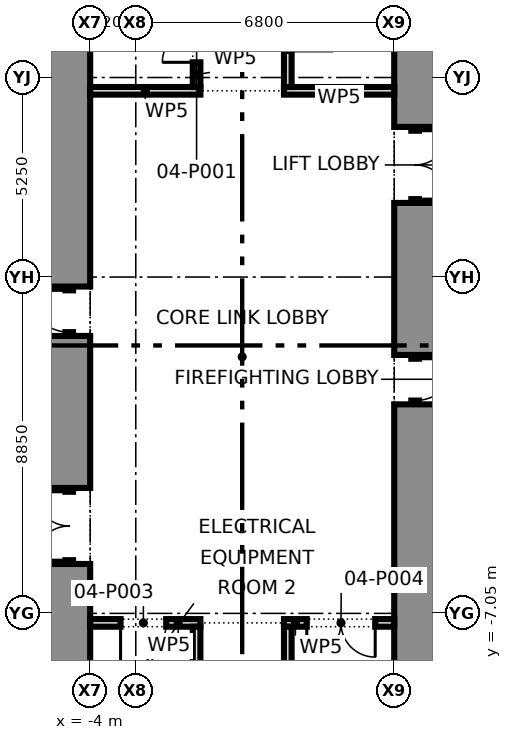
"""IFC4 building model, lengths in metres.
Left out: names, types, materials, properties, quantities, classifications, styles, units other than length and angle.
Written with IfcOpenShell. Run it as: python <this file> out.ifc"""

import sys

from ifc_helpers import new_model, si_unit, direction, frame, frame_2d, origin, place, context, subcontext, project, spatial, rectangle, extrude, element, fill, save


model = new_model("IFC4")
c1 = context("Model", 3, precision=1e-05, world=origin(), true_north=direction((0.0, 1.0)))
c2 = subcontext(c1, "Body", "Model", "MODEL_VIEW")
j1 = project(units=[si_unit("LENGTHUNIT", "METRE"), si_unit("PLANEANGLEUNIT", "RADIAN")], contexts=[c1])
p1 = place(None, origin())
s1 = spatial("IfcSite", under=j1, at=p1, CompositionType="ELEMENT")
p2 = place(p1, origin())
s2 = spatial("IfcBuilding", under=s1, at=p2, CompositionType="ELEMENT")
p3 = place(p2, frame((0.0, 0.0, 16.1)))
s3 = spatial("IfcBuildingStorey", under=s2, at=p3, CompositionType="ELEMENT", Elevation=16.1)
p4 = place(p3, frame((-4.55, -8.9, 0.0), z_axis=(0.0, 0.0, 1.0), x_axis=(0.0, 1.0, 0.0)))
e1 = element("IfcWall", 1, at=p4, inside=s3, PredefinedType="SHEAR", context=c2, shape_type="SweptSolid", body=[
    extrude(rectangle(XDim=3.15, YDim=1.1, at=frame_2d((1.575, 0.0))), origin(), (0.0, 0.0, 1.0), 4.575),
])
p5 = place(p3, frame((-4.55, -5.75, 0.0), z_axis=(0.0, 0.0, 1.0), x_axis=(0.0, 1.0, 0.0)))
e2 = element("IfcWall", 2, at=p5, inside=s3, PredefinedType="PARTITIONING", context=c2, shape_type="SweptSolid", body=[
    extrude(rectangle(XDim=2.0, YDim=0.2, at=frame_2d((1.0, 0.0))), origin(), (0.0, 0.0, 1.0), 2.4),
])
p6 = place(p5, frame((0.1, 0.0, 0.0)))
e3 = element("IfcOpeningElement", 3, at=p6, cuts=e2, PredefinedType="OPENING", context=c2, shape_type="SweptSolid", body=[
    extrude(rectangle(XDim=1.8, YDim=2.1, at=frame_2d((0.9, 1.05))), frame((0.0, 0.11, 0.0), z_axis=(0.0, -1.0, 0.0), x_axis=(1.0, 0.0, 0.0)), (0.0, 0.0, 1.0), 0.22),
])
p7 = place(p3, frame((-4.55, -3.75, 0.0), z_axis=(0.0, 0.0, 1.0), x_axis=(0.0, 1.0, 0.0)))
e4 = element("IfcWall", 4, at=p7, inside=s3, PredefinedType="SHEAR", context=c2, shape_type="SweptSolid", body=[
    extrude(rectangle(XDim=4.0, YDim=1.1, at=frame_2d((2.0, 0.0))), origin(), (0.0, 0.0, 1.0), 4.575),
])
p8 = place(p3, frame((-4.55, 0.25, 0.0), z_axis=(0.0, 0.0, 1.0), x_axis=(0.0, 1.0, 0.0)))
e5 = element("IfcWall", 5, at=p8, inside=s3, PredefinedType="PARTITIONING", context=c2, shape_type="SweptSolid", body=[
    extrude(rectangle(XDim=1.3, YDim=0.2, at=frame_2d((0.65, 0.0))), origin(), (0.0, 0.0, 1.0), 2.4),
])
p9 = place(p8, frame((0.1, 0.0, 0.0)))
e6 = element("IfcOpeningElement", 6, at=p9, cuts=e5, PredefinedType="OPENING", context=c2, shape_type="SweptSolid", body=[
    extrude(rectangle(XDim=1.1, YDim=2.1, at=frame_2d((0.55, 1.05))), frame((0.0, 0.11, 0.0), z_axis=(0.0, -1.0, 0.0), x_axis=(1.0, 0.0, 0.0)), (0.0, 0.0, 1.0), 0.22),
])
p10 = place(p3, frame((-4.55, 1.55, 0.0), z_axis=(0.0, 0.0, 1.0), x_axis=(0.0, 1.0, 0.0)))
e7 = element("IfcWall", 7, at=p10, inside=s3, PredefinedType="SHEAR", context=c2, shape_type="SweptSolid", body=[
    extrude(rectangle(XDim=7.35, YDim=1.1, at=frame_2d((3.675, 0.0))), origin(), (0.0, 0.0, 1.0), 4.575),
])
p11 = place(p3, frame((4.55, 8.9, 0.0), z_axis=(0.0, 0.0, 1.0), x_axis=(0.0, -1.0, 0.0)))
e8 = element("IfcWall", 8, at=p11, inside=s3, PredefinedType="SHEAR", context=c2, shape_type="SweptSolid", body=[
    extrude(rectangle(XDim=3.15, YDim=1.1, at=frame_2d((1.575, 0.0))), origin(), (0.0, 0.0, 1.0), 4.575),
])
p12 = place(p3, frame((4.55, 5.75, 0.0), z_axis=(0.0, 0.0, 1.0), x_axis=(0.0, -1.0, 0.0)))
e9 = element("IfcWall", 9, at=p12, inside=s3, PredefinedType="PARTITIONING", context=c2, shape_type="SweptSolid", body=[
    extrude(rectangle(XDim=2.0, YDim=0.2, at=frame_2d((1.0, 0.0))), origin(), (0.0, 0.0, 1.0), 2.4),
])
p13 = place(p12, frame((0.1, 0.0, 0.0)))
e10 = element("IfcOpeningElement", 10, at=p13, cuts=e9, PredefinedType="OPENING", context=c2, shape_type="SweptSolid", body=[
    extrude(rectangle(XDim=1.8, YDim=2.1, at=frame_2d((0.9, 1.05))), frame((0.0, 0.11, 0.0), z_axis=(0.0, -1.0, 0.0), x_axis=(1.0, 0.0, 0.0)), (0.0, 0.0, 1.0), 0.22),
])
p14 = place(p3, frame((4.55, 3.75, 0.0), z_axis=(0.0, 0.0, 1.0), x_axis=(0.0, -1.0, 0.0)))
e11 = element("IfcWall", 11, at=p14, inside=s3, PredefinedType="SHEAR", context=c2, shape_type="SweptSolid", body=[
    extrude(rectangle(XDim=4.0, YDim=1.1, at=frame_2d((2.0, 0.0))), origin(), (0.0, 0.0, 1.0), 4.575),
])
p15 = place(p3, frame((4.55, -0.25, 0.0), z_axis=(0.0, 0.0, 1.0), x_axis=(0.0, -1.0, 0.0)))
e12 = element("IfcWall", 12, at=p15, inside=s3, PredefinedType="PARTITIONING", context=c2, shape_type="SweptSolid", body=[
    extrude(rectangle(XDim=1.3, YDim=0.2, at=frame_2d((0.65, 0.0))), origin(), (0.0, 0.0, 1.0), 2.4),
])
p16 = place(p15, frame((0.1, 0.0, 0.0)))
e13 = element("IfcOpeningElement", 13, at=p16, cuts=e12, PredefinedType="OPENING", context=c2, shape_type="SweptSolid", body=[
    extrude(rectangle(XDim=1.1, YDim=2.1, at=frame_2d((0.55, 1.05))), frame((0.0, 0.11, 0.0), z_axis=(0.0, -1.0, 0.0), x_axis=(1.0, 0.0, 0.0)), (0.0, 0.0, 1.0), 0.22),
])
p17 = place(p3, frame((4.55, -1.55, 0.0), z_axis=(0.0, 0.0, 1.0), x_axis=(0.0, -1.0, 0.0)))
e14 = element("IfcWall", 14, at=p17, inside=s3, PredefinedType="SHEAR", context=c2, shape_type="SweptSolid", body=[
    extrude(rectangle(XDim=7.35, YDim=1.1, at=frame_2d((3.675, 0.0))), origin(), (0.0, 0.0, 1.0), 4.575),
])
p18 = place(p3, frame((-4.0, -7.3, 0.0), z_axis=(0.0, 0.0, 1.0), x_axis=(1.0, 0.0, 0.0)))
e15 = element("IfcWall", 15, at=p18, inside=s3, PredefinedType="PARTITIONING", context=c2, shape_type="SweptSolid", body=[
    extrude(rectangle(XDim=2.9, YDim=0.2, at=frame_2d((1.45, 0.0))), origin(), (0.0, 0.0, 1.0), 4.575),
])
p19 = place(p18, frame((0.8, 0.0, 0.0)))
e16 = element("IfcOpeningElement", 16, at=p19, cuts=e15, PredefinedType="OPENING", context=c2, shape_type="SweptSolid", body=[
    extrude(rectangle(XDim=1.2, YDim=2.1, at=frame_2d((0.6, 1.05))), frame((0.0, 0.11, 0.0), z_axis=(0.0, -1.0, 0.0), x_axis=(1.0, 0.0, 0.0)), (0.0, 0.0, 1.0), 0.22),
])
p20 = place(p3, frame((1.1, -7.3, 0.0), z_axis=(0.0, 0.0, 1.0), x_axis=(1.0, 0.0, 0.0)))
e17 = element("IfcWall", 17, at=p20, inside=s3, PredefinedType="PARTITIONING", context=c2, shape_type="SweptSolid", body=[
    extrude(rectangle(XDim=2.9, YDim=0.2, at=frame_2d((1.45, 0.0))), origin(), (0.0, 0.0, 1.0), 4.575),
])
p21 = place(p20, frame((0.6, 0.0, 0.0)))
e18 = element("IfcOpeningElement", 18, at=p21, cuts=e17, PredefinedType="OPENING", context=c2, shape_type="SweptSolid", body=[
    extrude(rectangle(XDim=1.8, YDim=2.1, at=frame_2d((0.9, 1.05))), frame((0.0, 0.11, 0.0), z_axis=(0.0, -1.0, 0.0), x_axis=(1.0, 0.0, 0.0)), (0.0, 0.0, 1.0), 0.22),
])
for number, where, z_axis, x_axis in (
    (19, (-4.0, 6.7, 0.0), (0.0, 0.0, 1.0), (1.0, 0.0, 0.0)),
    (20, (1.1, 6.7, 0.0), (0.0, 0.0, 1.0), (1.0, 0.0, 0.0)),
):
    element("IfcWall", number, at=place(p3, frame(where, z_axis=z_axis, x_axis=x_axis)), inside=s3, PredefinedType="PARTITIONING", context=c2, shape_type="SweptSolid", body=[
        extrude(rectangle(XDim=2.9, YDim=0.2, at=frame_2d((1.45, 0.0))), origin(), (0.0, 0.0, 1.0), 4.575),
    ])
p22 = place(p3, frame((1.2, -9.9, 0.0), z_axis=(0.0, 0.0, 1.0), x_axis=(0.0, 1.0, 0.0)))
e21 = element("IfcWall", 21, at=p22, inside=s3, PredefinedType="PARTITIONING", context=c2, shape_type="SweptSolid", body=[
    extrude(rectangle(XDim=2.5, YDim=0.2, at=frame_2d((1.25, 0.0))), origin(), (0.0, 0.0, 1.0), 4.575),
])
p23 = place(p3, frame((1.2, 6.8, 0.0), z_axis=(0.0, 0.0, 1.0), x_axis=(0.0, 1.0, 0.0)))
e22 = element("IfcWall", 22, at=p23, inside=s3, PredefinedType="PARTITIONING", context=c2, shape_type="SweptSolid", body=[
    extrude(rectangle(XDim=3.1, YDim=0.2, at=frame_2d((1.55, 0.0))), origin(), (0.0, 0.0, 1.0), 4.575),
])
p24 = place(p23, frame((0.95, 0.0, 0.0)))
e23 = element("IfcOpeningElement", 23, at=p24, cuts=e22, PredefinedType="OPENING", context=c2, shape_type="SweptSolid", body=[
    extrude(rectangle(XDim=1.2, YDim=2.1, at=frame_2d((0.6, 1.05))), frame((0.0, 0.11, 0.0), z_axis=(0.0, -1.0, 0.0), x_axis=(1.0, 0.0, 0.0)), (0.0, 0.0, 1.0), 0.22),
])
p25 = place(p3, frame((-1.2, -9.9, 0.0), z_axis=(0.0, 0.0, 1.0), x_axis=(0.0, 1.0, 0.0)))
e24 = element("IfcWall", 24, at=p25, inside=s3, PredefinedType="PARTITIONING", context=c2, shape_type="SweptSolid", body=[
    extrude(rectangle(XDim=2.5, YDim=0.2, at=frame_2d((1.25, 0.0))), origin(), (0.0, 0.0, 1.0), 4.575),
])
p26 = place(p3, frame((-1.2, 6.8, 0.0), z_axis=(0.0, 0.0, 1.0), x_axis=(0.0, 1.0, 0.0)))
e25 = element("IfcWall", 25, at=p26, inside=s3, PredefinedType="PARTITIONING", context=c2, shape_type="SweptSolid", body=[
    extrude(rectangle(XDim=3.1, YDim=0.2, at=frame_2d((1.55, 0.0))), origin(), (0.0, 0.0, 1.0), 4.575),
])
p27 = place(p26, frame((0.65, 0.0, 0.0)))
e26 = element("IfcOpeningElement", 26, at=p27, cuts=e25, PredefinedType="OPENING", context=c2, shape_type="SweptSolid", body=[
    extrude(rectangle(XDim=1.8, YDim=2.1, at=frame_2d((0.9, 1.05))), frame((0.0, 0.11, 0.0), z_axis=(0.0, -1.0, 0.0), x_axis=(1.0, 0.0, 0.0)), (0.0, 0.0, 1.0), 0.22),
])
p28 = place(p6, origin())
e27 = element("IfcDoor", 27, at=p28, inside=s3, OperationType="DOUBLE_DOOR_SINGLE_SWING", PredefinedType="DOOR", context=c2, shape_type="SweptSolid", body=[
    extrude(rectangle(XDim=1.8, YDim=2.1, at=frame_2d((0.9, 1.05))), frame((0.0, 0.025, 0.0), z_axis=(0.0, -1.0, 0.0), x_axis=(1.0, 0.0, 0.0)), (0.0, 0.0, 1.0), 0.05),
])
fill(e3, e27)
p29 = place(p9, origin())
e28 = element("IfcDoor", 28, at=p29, inside=s3, OperationType="SINGLE_SWING_RIGHT", PredefinedType="DOOR", context=c2, shape_type="SweptSolid", body=[
    extrude(rectangle(XDim=1.1, YDim=2.1, at=frame_2d((0.55, 1.05))), frame((0.0, 0.025, 0.0), z_axis=(0.0, -1.0, 0.0), x_axis=(1.0, 0.0, 0.0)), (0.0, 0.0, 1.0), 0.05),
])
fill(e6, e28)
p30 = place(p13, origin())
e29 = element("IfcDoor", 29, at=p30, inside=s3, OperationType="DOUBLE_DOOR_SINGLE_SWING", PredefinedType="DOOR", context=c2, shape_type="SweptSolid", body=[
    extrude(rectangle(XDim=1.8, YDim=2.1, at=frame_2d((0.9, 1.05))), frame((0.0, 0.025, 0.0), z_axis=(0.0, -1.0, 0.0), x_axis=(1.0, 0.0, 0.0)), (0.0, 0.0, 1.0), 0.05),
])
fill(e10, e29)
p31 = place(p16, origin())
e30 = element("IfcDoor", 30, at=p31, inside=s3, OperationType="SINGLE_SWING_LEFT", PredefinedType="DOOR", context=c2, shape_type="SweptSolid", body=[
    extrude(rectangle(XDim=1.1, YDim=2.1, at=frame_2d((0.55, 1.05))), frame((0.0, 0.025, 0.0), z_axis=(0.0, -1.0, 0.0), x_axis=(1.0, 0.0, 0.0)), (0.0, 0.0, 1.0), 0.05),
])
fill(e13, e30)
p32 = place(p27, origin())
e31 = element("IfcDoor", 31, at=p32, inside=s3, OperationType="DOUBLE_DOOR_SINGLE_SWING", PredefinedType="DOOR", context=c2, shape_type="SweptSolid", body=[
    extrude(rectangle(XDim=1.8, YDim=2.1, at=frame_2d((0.9, 1.05))), frame((0.0, 0.025, 0.0), z_axis=(0.0, -1.0, 0.0), x_axis=(1.0, 0.0, 0.0)), (0.0, 0.0, 1.0), 0.05),
])
fill(e26, e31)
p33 = place(p19, frame((1.2, 0.0, 0.0), z_axis=(0.0, 0.0, 1.0), x_axis=(-1.0, 0.0, 0.0)))
e32 = element("IfcDoor", 32, at=p33, inside=s3, OperationType="SINGLE_SWING_RIGHT", PredefinedType="DOOR", context=c2, shape_type="SweptSolid", body=[
    extrude(rectangle(XDim=1.2, YDim=2.1, at=frame_2d((0.6, 1.05))), frame((0.0, 0.025, 0.0), z_axis=(0.0, -1.0, 0.0), x_axis=(1.0, 0.0, 0.0)), (0.0, 0.0, 1.0), 0.05),
])
fill(e16, e32)
p34 = place(p21, frame((1.8, 0.0, 0.0), z_axis=(0.0, 0.0, 1.0), x_axis=(-1.0, 0.0, 0.0)))
e33 = element("IfcDoor", 33, at=p34, inside=s3, OperationType="DOUBLE_DOOR_SINGLE_SWING", PredefinedType="DOOR", context=c2, shape_type="SweptSolid", body=[
    extrude(rectangle(XDim=1.8, YDim=2.1, at=frame_2d((0.9, 1.05))), frame((0.0, 0.025, 0.0), z_axis=(0.0, -1.0, 0.0), x_axis=(1.0, 0.0, 0.0)), (0.0, 0.0, 1.0), 0.05),
])
fill(e18, e33)
save(model, sys.argv[1])
